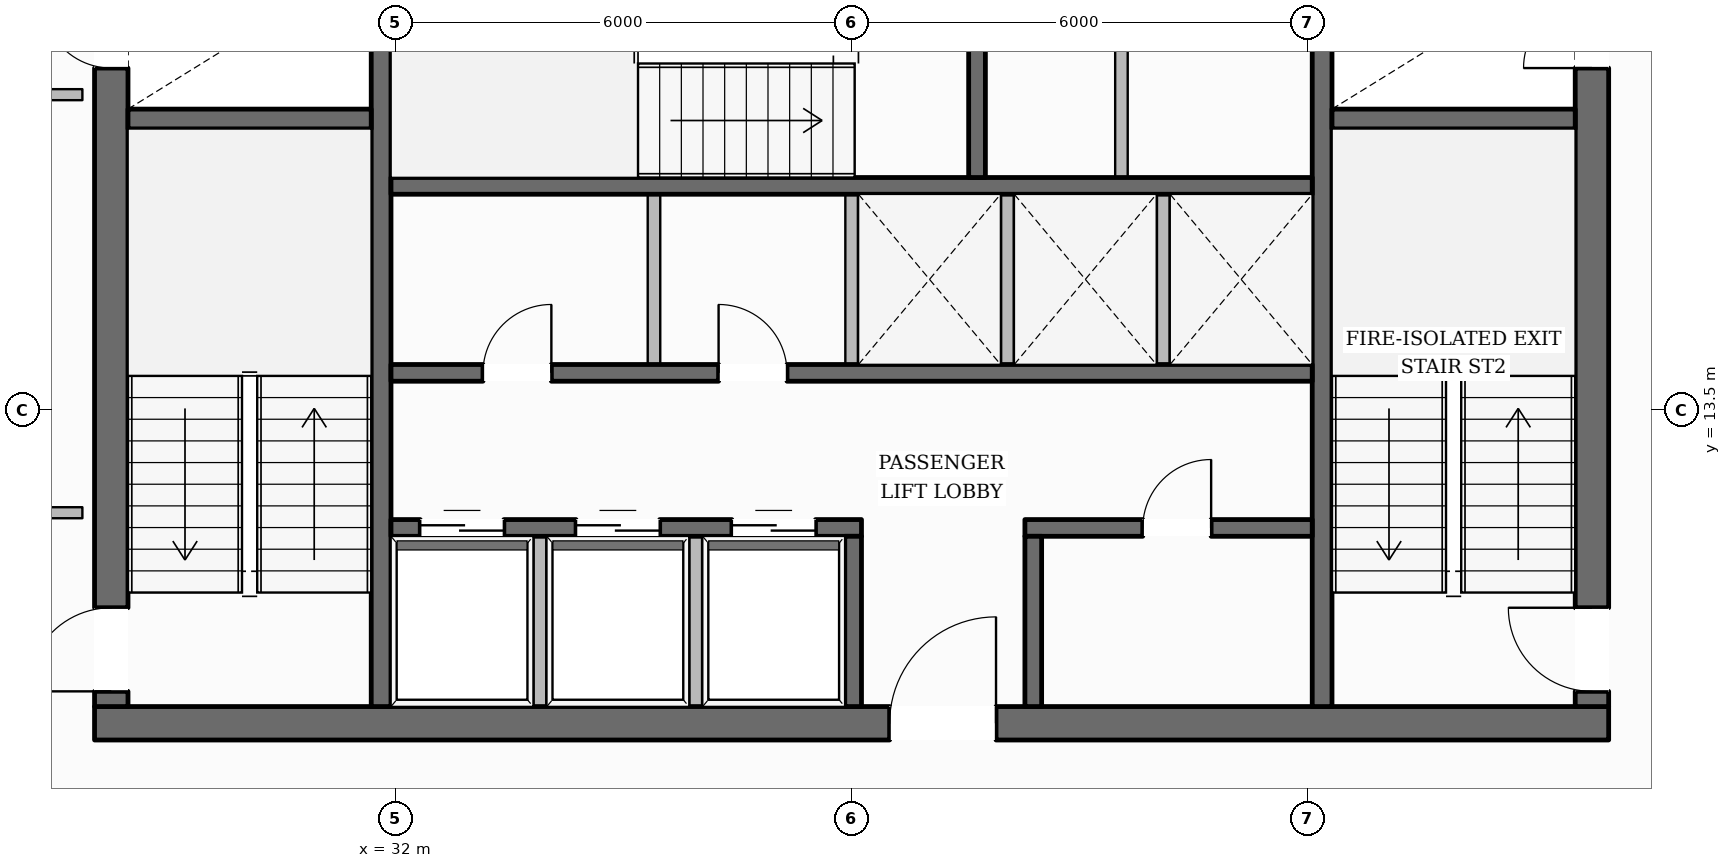
"""IFC4 building model, lengths in metres.
Left out: names, types, materials, properties, quantities, classifications, styles, units other than length and angle.
Written with IfcOpenShell. Run it as: python <this file> out.ifc"""

import sys

from ifc_helpers import new_model, si_unit, direction, frame, frame_2d, origin, place, context, subcontext, project, spatial, rectangle, extrude, element, fill, save


model = new_model("IFC4")
c1 = context("Model", 3, precision=1e-05, world=origin(), true_north=direction((0.0, 1.0)))
c2 = subcontext(c1, "Body", "Model", "MODEL_VIEW")
j1 = project(units=[si_unit("LENGTHUNIT", "METRE"), si_unit("PLANEANGLEUNIT", "RADIAN")], contexts=[c1])
p1 = place(None, origin())
s1 = spatial("IfcSite", under=j1, at=p1, CompositionType="ELEMENT")
p2 = place(p1, origin())
s2 = spatial("IfcBuilding", under=s1, at=p2, CompositionType="ELEMENT")
p3 = place(p2, frame((0.0, 0.0, 165.0)))
s3 = spatial("IfcBuildingStorey", under=s2, at=p3, CompositionType="ELEMENT", Elevation=165.0)
p4 = place(p3, frame((28.04, 9.38, 0.0), z_axis=(0.0, 0.0, 1.0), x_axis=(1.0, 0.0, 0.0)))
e1 = element("IfcWall", 1, at=p4, inside=s3, PredefinedType="SOLIDWALL", context=c2, shape_type="SweptSolid", body=[
    extrude(rectangle(XDim=19.92, YDim=0.44, at=frame_2d((9.96, 0.0))), origin(), (0.0, 0.0, 1.0), 3.6),
])
p5 = place(p4, frame((10.46, 0.0, 0.0)))
e2 = element("IfcOpeningElement", 2, at=p5, cuts=e1, PredefinedType="OPENING", context=c2, shape_type="SweptSolid", body=[
    extrude(rectangle(XDim=1.4, YDim=2.2, at=frame_2d((0.7, 1.1))), frame((0.0, 0.23, 0.0), z_axis=(0.0, -1.0, 0.0), x_axis=(1.0, 0.0, 0.0)), (0.0, 0.0, 1.0), 0.46),
])
p6 = place(p3, frame((28.26, 9.6, 0.0), z_axis=(0.0, 0.0, 1.0), x_axis=(0.0, 1.0, 0.0)))
e3 = element("IfcWall", 3, at=p6, inside=s3, PredefinedType="SOLIDWALL", context=c2, shape_type="SweptSolid", body=[
    extrude(rectangle(XDim=13.0, YDim=0.44, at=frame_2d((6.5, 0.0))), origin(), (0.0, 0.0, 1.0), 3.6),
])
p7 = place(p6, frame((0.2, 0.0, 0.0)))
e4 = element("IfcOpeningElement", 4, at=p7, cuts=e3, PredefinedType="OPENING", context=c2, shape_type="SweptSolid", body=[
    extrude(rectangle(XDim=1.1, YDim=2.15, at=frame_2d((0.55, 1.075))), frame((0.0, 0.23, 0.0), z_axis=(0.0, -1.0, 0.0), x_axis=(1.0, 0.0, 0.0)), (0.0, 0.0, 1.0), 0.46),
])
p8 = place(p6, frame((8.4, 0.0, 0.0)))
e5 = element("IfcOpeningElement", 5, at=p8, cuts=e3, PredefinedType="OPENING", context=c2, shape_type="SweptSolid", body=[
    extrude(rectangle(XDim=0.9, YDim=2.1, at=frame_2d((0.45, 1.05))), frame((0.0, 0.23, 0.0), z_axis=(0.0, -1.0, 0.0), x_axis=(1.0, 0.0, 0.0)), (0.0, 0.0, 1.0), 0.46),
])
p9 = place(p3, frame((47.74, 9.6, 0.0), z_axis=(0.0, 0.0, 1.0), x_axis=(0.0, 1.0, 0.0)))
e6 = element("IfcWall", 6, at=p9, inside=s3, PredefinedType="SOLIDWALL", context=c2, shape_type="SweptSolid", body=[
    extrude(rectangle(XDim=13.0, YDim=0.44, at=frame_2d((6.5, 0.0))), origin(), (0.0, 0.0, 1.0), 3.6),
])
p10 = place(p9, frame((0.2, 0.0, 0.0)))
e7 = element("IfcOpeningElement", 7, at=p10, cuts=e6, PredefinedType="OPENING", context=c2, shape_type="SweptSolid", body=[
    extrude(rectangle(XDim=1.1, YDim=2.15, at=frame_2d((0.55, 1.075))), frame((0.0, 0.23, 0.0), z_axis=(0.0, -1.0, 0.0), x_axis=(1.0, 0.0, 0.0)), (0.0, 0.0, 1.0), 0.46),
])
p11 = place(p9, frame((8.4, 0.0, 0.0)))
e8 = element("IfcOpeningElement", 8, at=p11, cuts=e6, PredefinedType="OPENING", context=c2, shape_type="SweptSolid", body=[
    extrude(rectangle(XDim=0.9, YDim=2.1, at=frame_2d((0.45, 1.05))), frame((0.0, 0.23, 0.0), z_axis=(0.0, -1.0, 0.0), x_axis=(1.0, 0.0, 0.0)), (0.0, 0.0, 1.0), 0.46),
])
p12 = place(p3, frame((31.81, 9.6, 0.0), z_axis=(0.0, 0.0, 1.0), x_axis=(0.0, 1.0, 0.0)))
e9 = element("IfcWall", 9, at=p12, inside=s3, PredefinedType="SHEAR", context=c2, shape_type="SweptSolid", body=[
    extrude(rectangle(XDim=13.0, YDim=0.26, at=frame_2d((6.5, 0.0))), origin(), (0.0, 0.0, 1.0), 3.6),
])
p13 = place(p12, frame((10.925, 0.0, 0.0)))
e10 = element("IfcOpeningElement", 10, at=p13, cuts=e9, PredefinedType="OPENING", context=c2, shape_type="SweptSolid", body=[
    extrude(rectangle(XDim=1.25, YDim=2.25, at=frame_2d((0.625, 1.125))), frame((0.0, 0.14, 0.0), z_axis=(0.0, -1.0, 0.0), x_axis=(1.0, 0.0, 0.0)), (0.0, 0.0, 1.0), 0.28),
])
p14 = place(p3, frame((44.19, 9.6, 0.0), z_axis=(0.0, 0.0, 1.0), x_axis=(0.0, 1.0, 0.0)))
e11 = element("IfcWall", 11, at=p14, inside=s3, PredefinedType="SHEAR", context=c2, shape_type="SweptSolid", body=[
    extrude(rectangle(XDim=13.0, YDim=0.26, at=frame_2d((6.5, 0.0))), origin(), (0.0, 0.0, 1.0), 3.6),
])
p15 = place(p14, frame((10.925, 0.0, 0.0)))
e12 = element("IfcOpeningElement", 12, at=p15, cuts=e11, PredefinedType="OPENING", context=c2, shape_type="SweptSolid", body=[
    extrude(rectangle(XDim=1.25, YDim=2.25, at=frame_2d((0.625, 1.125))), frame((0.0, 0.14, 0.0), z_axis=(0.0, -1.0, 0.0), x_axis=(1.0, 0.0, 0.0)), (0.0, 0.0, 1.0), 0.28),
])
for number, where, z_axis, x_axis in (
    (13, (28.48, 17.33, 0.0), (0.0, 0.0, 1.0), (1.0, 0.0, 0.0)),
    (14, (44.32, 17.33, 0.0), (0.0, 0.0, 1.0), (1.0, 0.0, 0.0)),
):
    element("IfcWall", number, at=place(p3, frame(where, z_axis=z_axis, x_axis=x_axis)), inside=s3, PredefinedType="SHEAR", context=c2, shape_type="SweptSolid", body=[
        extrude(rectangle(XDim=3.2, YDim=0.26, at=frame_2d((1.6, 0.0))), origin(), (0.0, 0.0, 1.0), 3.6),
    ])
p16 = place(p3, frame((31.94, 16.45, 0.0), z_axis=(0.0, 0.0, 1.0), x_axis=(1.0, 0.0, 0.0)))
e15 = element("IfcWall", 15, at=p16, inside=s3, PredefinedType="SOLIDWALL", context=c2, shape_type="SweptSolid", body=[
    extrude(rectangle(XDim=12.12, YDim=0.22, at=frame_2d((6.06, 0.0))), origin(), (0.0, 0.0, 1.0), 3.6),
])
p17 = place(p3, frame((39.65, 16.56, 0.0), z_axis=(0.0, 0.0, 1.0), x_axis=(0.0, 1.0, 0.0)))
e16 = element("IfcWall", 16, at=p17, inside=s3, PredefinedType="SOLIDWALL", context=c2, shape_type="SweptSolid", body=[
    extrude(rectangle(XDim=3.2, YDim=0.22, at=frame_2d((1.6, 0.0))), origin(), (0.0, 0.0, 1.0), 3.6),
])
p18 = place(p3, frame((31.94, 13.99, 0.0), z_axis=(0.0, 0.0, 1.0), x_axis=(1.0, 0.0, 0.0)))
e17 = element("IfcWall", 17, at=p18, inside=s3, PredefinedType="SOLIDWALL", context=c2, shape_type="SweptSolid", body=[
    extrude(rectangle(XDim=12.12, YDim=0.22, at=frame_2d((6.06, 0.0))), origin(), (0.0, 0.0, 1.0), 3.6),
])
p19 = place(p18, frame((1.21, 0.0, 0.0)))
e18 = element("IfcOpeningElement", 18, at=p19, cuts=e17, PredefinedType="OPENING", context=c2, shape_type="SweptSolid", body=[
    extrude(rectangle(XDim=0.9, YDim=2.1, at=frame_2d((0.45, 1.05))), frame((0.0, 0.12, 0.0), z_axis=(0.0, -1.0, 0.0), x_axis=(1.0, 0.0, 0.0)), (0.0, 0.0, 1.0), 0.24),
])
p20 = place(p18, frame((4.31, 0.0, 0.0)))
e19 = element("IfcOpeningElement", 19, at=p20, cuts=e17, PredefinedType="OPENING", context=c2, shape_type="SweptSolid", body=[
    extrude(rectangle(XDim=0.9, YDim=2.1, at=frame_2d((0.45, 1.05))), frame((0.0, 0.12, 0.0), z_axis=(0.0, -1.0, 0.0), x_axis=(1.0, 0.0, 0.0)), (0.0, 0.0, 1.0), 0.24),
])
p21 = place(p3, frame((31.94, 11.95, 0.0), z_axis=(0.0, 0.0, 1.0), x_axis=(1.0, 0.0, 0.0)))
e20 = element("IfcWall", 20, at=p21, inside=s3, PredefinedType="SOLIDWALL", context=c2, shape_type="SweptSolid", body=[
    extrude(rectangle(XDim=6.19, YDim=0.22, at=frame_2d((3.095, 0.0))), origin(), (0.0, 0.0, 1.0), 3.6),
])
p22 = place(p21, frame((0.385, 0.0, 0.0)))
e21 = element("IfcOpeningElement", 21, at=p22, cuts=e20, PredefinedType="OPENING", context=c2, shape_type="SweptSolid", body=[
    extrude(rectangle(XDim=1.1, YDim=2.2, at=frame_2d((0.55, 1.1))), frame((0.0, 0.12, 0.0), z_axis=(0.0, -1.0, 0.0), x_axis=(1.0, 0.0, 0.0)), (0.0, 0.0, 1.0), 0.24),
])
p23 = place(p21, frame((2.435, 0.0, 0.0)))
e22 = element("IfcOpeningElement", 22, at=p23, cuts=e20, PredefinedType="OPENING", context=c2, shape_type="SweptSolid", body=[
    extrude(rectangle(XDim=1.1, YDim=2.2, at=frame_2d((0.55, 1.1))), frame((0.0, 0.12, 0.0), z_axis=(0.0, -1.0, 0.0), x_axis=(1.0, 0.0, 0.0)), (0.0, 0.0, 1.0), 0.24),
])
p24 = place(p21, frame((4.485, 0.0, 0.0)))
e23 = element("IfcOpeningElement", 23, at=p24, cuts=e20, PredefinedType="OPENING", context=c2, shape_type="SweptSolid", body=[
    extrude(rectangle(XDim=1.1, YDim=2.2, at=frame_2d((0.55, 1.1))), frame((0.0, 0.12, 0.0), z_axis=(0.0, -1.0, 0.0), x_axis=(1.0, 0.0, 0.0)), (0.0, 0.0, 1.0), 0.24),
])
p25 = place(p3, frame((40.28, 11.95, 0.0), z_axis=(0.0, 0.0, 1.0), x_axis=(1.0, 0.0, 0.0)))
e24 = element("IfcWall", 24, at=p25, inside=s3, PredefinedType="SOLIDWALL", context=c2, shape_type="SweptSolid", body=[
    extrude(rectangle(XDim=3.78, YDim=0.22, at=frame_2d((1.89, 0.0))), origin(), (0.0, 0.0, 1.0), 3.6),
])
p26 = place(p25, frame((1.55, 0.0, 0.0)))
e25 = element("IfcOpeningElement", 25, at=p26, cuts=e24, PredefinedType="OPENING", context=c2, shape_type="SweptSolid", body=[
    extrude(rectangle(XDim=0.9, YDim=2.1, at=frame_2d((0.45, 1.05))), frame((0.0, 0.12, 0.0), z_axis=(0.0, -1.0, 0.0), x_axis=(1.0, 0.0, 0.0)), (0.0, 0.0, 1.0), 0.24),
])
for number, where, z_axis, x_axis in (
    (26, (38.02, 9.6, 0.0), (0.0, 0.0, 1.0), (0.0, 1.0, 0.0)),
    (27, (40.39, 9.6, 0.0), (0.0, 0.0, 1.0), (0.0, 1.0, 0.0)),
):
    element("IfcWall", number, at=place(p3, frame(where, z_axis=z_axis, x_axis=x_axis)), inside=s3, PredefinedType="SOLIDWALL", context=c2, shape_type="SweptSolid", body=[
        extrude(rectangle(XDim=2.24, YDim=0.22, at=frame_2d((1.12, 0.0))), origin(), (0.0, 0.0, 1.0), 3.6),
    ])
p27 = place(p3, frame((14.964, 12.319, 0.0), z_axis=(0.0, 0.0, 1.0), x_axis=(0.493387150796, 0.869809817966, 0.0)))
e28 = element("IfcWall", 28, at=p27, inside=s3, PredefinedType="STANDARD", context=c2, shape_type="SweptSolid", body=[
    extrude(rectangle(XDim=37.096, YDim=0.35, at=frame_2d((18.548, 0.0))), origin(), (0.0, 0.0, 1.0), 3.132),
])
p28 = place(p27, frame((32.879, 0.0, 0.65)))
e29 = element("IfcOpeningElement", 29, at=p28, cuts=e28, PredefinedType="OPENING", context=c2, shape_type="SweptSolid", body=[
    extrude(rectangle(XDim=1.45, YDim=1.75, at=frame_2d((0.725, 0.875))), frame((0.0, 0.185, 0.0), z_axis=(0.0, -1.0, 0.0), x_axis=(1.0, 0.0, 0.0)), (0.0, 0.0, 1.0), 0.37),
])
p29 = place(p27, frame((26.855, 0.0, 0.65)))
e30 = element("IfcOpeningElement", 30, at=p29, cuts=e28, PredefinedType="OPENING", context=c2, shape_type="SweptSolid", body=[
    extrude(rectangle(XDim=1.45, YDim=1.75, at=frame_2d((0.725, 0.875))), frame((0.0, 0.185, 0.0), z_axis=(0.0, -1.0, 0.0), x_axis=(1.0, 0.0, 0.0)), (0.0, 0.0, 1.0), 0.37),
])
p30 = place(p27, frame((14.807, 0.0, 0.65)))
e31 = element("IfcOpeningElement", 31, at=p30, cuts=e28, PredefinedType="OPENING", context=c2, shape_type="SweptSolid", body=[
    extrude(rectangle(XDim=1.45, YDim=1.75, at=frame_2d((0.725, 0.875))), frame((0.0, 0.185, 0.0), z_axis=(0.0, -1.0, 0.0), x_axis=(1.0, 0.0, 0.0)), (0.0, 0.0, 1.0), 0.37),
])
p31 = place(p27, frame((8.783, 0.0, 0.65)))
e32 = element("IfcOpeningElement", 32, at=p31, cuts=e28, PredefinedType="OPENING", context=c2, shape_type="SweptSolid", body=[
    extrude(rectangle(XDim=1.45, YDim=1.75, at=frame_2d((0.725, 0.875))), frame((0.0, 0.185, 0.0), z_axis=(0.0, -1.0, 0.0), x_axis=(1.0, 0.0, 0.0)), (0.0, 0.0, 1.0), 0.37),
])
p32 = place(p27, frame((2.759, 0.0, 0.65)))
e33 = element("IfcOpeningElement", 33, at=p32, cuts=e28, PredefinedType="OPENING", context=c2, shape_type="SweptSolid", body=[
    extrude(rectangle(XDim=1.45, YDim=1.75, at=frame_2d((0.725, 0.875))), frame((0.0, 0.185, 0.0), z_axis=(0.0, -1.0, 0.0), x_axis=(1.0, 0.0, 0.0)), (0.0, 0.0, 1.0), 0.37),
])
p33 = place(p3, frame((42.733, 44.585, 0.0), z_axis=(0.0, 0.0, 1.0), x_axis=(0.493387150796, -0.869809817966, 0.0)))
e34 = element("IfcWall", 34, at=p33, inside=s3, PredefinedType="STANDARD", context=c2, shape_type="SweptSolid", body=[
    extrude(rectangle(XDim=37.096, YDim=0.35, at=frame_2d((18.548, 0.0))), origin(), (0.0, 0.0, 1.0), 3.132),
])
p34 = place(p33, frame((32.886, 0.0, 0.65)))
e35 = element("IfcOpeningElement", 35, at=p34, cuts=e34, PredefinedType="OPENING", context=c2, shape_type="SweptSolid", body=[
    extrude(rectangle(XDim=1.45, YDim=1.75, at=frame_2d((0.725, 0.875))), frame((0.0, 0.185, 0.0), z_axis=(0.0, -1.0, 0.0), x_axis=(1.0, 0.0, 0.0)), (0.0, 0.0, 1.0), 0.37),
])
p35 = place(p33, frame((26.863, 0.0, 0.65)))
e36 = element("IfcOpeningElement", 36, at=p35, cuts=e34, PredefinedType="OPENING", context=c2, shape_type="SweptSolid", body=[
    extrude(rectangle(XDim=1.45, YDim=1.75, at=frame_2d((0.725, 0.875))), frame((0.0, 0.185, 0.0), z_axis=(0.0, -1.0, 0.0), x_axis=(1.0, 0.0, 0.0)), (0.0, 0.0, 1.0), 0.37),
])
p36 = place(p33, frame((14.814, 0.0, 0.65)))
e37 = element("IfcOpeningElement", 37, at=p36, cuts=e34, PredefinedType="OPENING", context=c2, shape_type="SweptSolid", body=[
    extrude(rectangle(XDim=1.45, YDim=1.75, at=frame_2d((0.725, 0.875))), frame((0.0, 0.185, 0.0), z_axis=(0.0, -1.0, 0.0), x_axis=(1.0, 0.0, 0.0)), (0.0, 0.0, 1.0), 0.37),
])
p37 = place(p33, frame((8.791, 0.0, 0.65)))
e38 = element("IfcOpeningElement", 38, at=p37, cuts=e34, PredefinedType="OPENING", context=c2, shape_type="SweptSolid", body=[
    extrude(rectangle(XDim=1.45, YDim=1.75, at=frame_2d((0.725, 0.875))), frame((0.0, 0.185, 0.0), z_axis=(0.0, -1.0, 0.0), x_axis=(1.0, 0.0, 0.0)), (0.0, 0.0, 1.0), 0.37),
])
p38 = place(p33, frame((2.767, 0.0, 0.65)))
e39 = element("IfcOpeningElement", 39, at=p38, cuts=e34, PredefinedType="OPENING", context=c2, shape_type="SweptSolid", body=[
    extrude(rectangle(XDim=1.45, YDim=1.75, at=frame_2d((0.725, 0.875))), frame((0.0, 0.185, 0.0), z_axis=(0.0, -1.0, 0.0), x_axis=(1.0, 0.0, 0.0)), (0.0, 0.0, 1.0), 0.37),
])
for number, where, z_axis, x_axis in (
    (40, (33.9, 9.52, 0.0), (0.0, 0.0, 1.0), (0.0, 1.0, 0.0)),
    (41, (35.95, 9.52, 0.0), (0.0, 0.0, 1.0), (0.0, 1.0, 0.0)),
):
    element("IfcWall", number, at=place(p3, frame(where, z_axis=z_axis, x_axis=x_axis)), inside=s3, PredefinedType="PARTITIONING", context=c2, shape_type="SweptSolid", body=[
        extrude(rectangle(XDim=2.32, YDim=0.165, at=frame_2d((1.16, 0.0))), origin(), (0.0, 0.0, 1.0), 3.6),
    ])
for number, where, z_axis, x_axis in (
    (42, (38.0, 14.1, 0.0), (0.0, 0.0, 1.0), (0.0, 1.0, 0.0)),
    (43, (35.4, 14.1, 0.0), (0.0, 0.0, 1.0), (0.0, 1.0, 0.0)),
    (44, (40.05, 14.1, 0.0), (0.0, 0.0, 1.0), (0.0, 1.0, 0.0)),
    (45, (42.1, 14.1, 0.0), (0.0, 0.0, 1.0), (0.0, 1.0, 0.0)),
):
    element("IfcWall", number, at=place(p3, frame(where, z_axis=z_axis, x_axis=x_axis)), inside=s3, PredefinedType="PARTITIONING", context=c2, shape_type="SweptSolid", body=[
        extrude(rectangle(XDim=2.24, YDim=0.165, at=frame_2d((1.12, 0.0))), origin(), (0.0, 0.0, 1.0), 3.6),
    ])
p39 = place(p3, frame((41.55, 16.56, 0.0), z_axis=(0.0, 0.0, 1.0), x_axis=(0.0, 1.0, 0.0)))
e46 = element("IfcWall", 46, at=p39, inside=s3, PredefinedType="PARTITIONING", context=c2, shape_type="SweptSolid", body=[
    extrude(rectangle(XDim=3.2, YDim=0.165, at=frame_2d((1.6, 0.0))), origin(), (0.0, 0.0, 1.0), 3.6),
])
for number, where, z_axis, x_axis in (
    (47, (27.88, 17.65, 0.0), (0.0, 0.0, 1.0), (-1.0, 0.0, 0.0)),
    (48, (26.06, 12.15, 0.0), (0.0, 0.0, 1.0), (1.0, 0.0, 0.0)),
):
    element("IfcWall", number, at=place(p3, frame(where, z_axis=z_axis, x_axis=x_axis)), inside=s3, PredefinedType="PARTITIONING", context=c2, shape_type="SweptSolid", body=[
        extrude(rectangle(XDim=1.82, YDim=0.145, at=frame_2d((0.91, 0.0))), origin(), (0.0, 0.0, 1.0), 3.6),
    ])
p40 = place(p7, origin())
e49 = element("IfcDoor", 49, at=p40, inside=s3, OperationType="SINGLE_SWING_LEFT", PredefinedType="DOOR", context=c2, shape_type="SweptSolid", body=[
    extrude(rectangle(XDim=1.1, YDim=2.15, at=frame_2d((0.55, 1.075))), frame((0.0, 0.025, 0.0), z_axis=(0.0, -1.0, 0.0), x_axis=(1.0, 0.0, 0.0)), (0.0, 0.0, 1.0), 0.05),
])
fill(e4, e49)
p41 = place(p10, origin())
e50 = element("IfcDoor", 50, at=p41, inside=s3, OperationType="SINGLE_SWING_RIGHT", PredefinedType="DOOR", context=c2, shape_type="SweptSolid", body=[
    extrude(rectangle(XDim=1.1, YDim=2.15, at=frame_2d((0.55, 1.075))), frame((0.0, 0.025, 0.0), z_axis=(0.0, -1.0, 0.0), x_axis=(1.0, 0.0, 0.0)), (0.0, 0.0, 1.0), 0.05),
])
fill(e7, e50)
p42 = place(p8, origin())
e51 = element("IfcDoor", 51, at=p42, inside=s3, OperationType="SINGLE_SWING_RIGHT", PredefinedType="DOOR", context=c2, shape_type="SweptSolid", body=[
    extrude(rectangle(XDim=0.9, YDim=2.1, at=frame_2d((0.45, 1.05))), frame((0.0, 0.025, 0.0), z_axis=(0.0, -1.0, 0.0), x_axis=(1.0, 0.0, 0.0)), (0.0, 0.0, 1.0), 0.05),
])
fill(e5, e51)
p43 = place(p11, origin())
e52 = element("IfcDoor", 52, at=p43, inside=s3, OperationType="SINGLE_SWING_LEFT", PredefinedType="DOOR", context=c2, shape_type="SweptSolid", body=[
    extrude(rectangle(XDim=0.9, YDim=2.1, at=frame_2d((0.45, 1.05))), frame((0.0, 0.025, 0.0), z_axis=(0.0, -1.0, 0.0), x_axis=(1.0, 0.0, 0.0)), (0.0, 0.0, 1.0), 0.05),
])
fill(e8, e52)
p44 = place(p5, origin())
e53 = element("IfcDoor", 53, at=p44, inside=s3, OperationType="SINGLE_SWING_RIGHT", PredefinedType="DOOR", context=c2, shape_type="SweptSolid", body=[
    extrude(rectangle(XDim=1.4, YDim=2.2, at=frame_2d((0.7, 1.1))), frame((0.0, 0.025, 0.0), z_axis=(0.0, -1.0, 0.0), x_axis=(1.0, 0.0, 0.0)), (0.0, 0.0, 1.0), 0.05),
])
fill(e2, e53)
p45 = place(p22, origin())
e54 = element("IfcDoor", 54, at=p45, inside=s3, OperationType="DOUBLE_DOOR_SLIDING", PredefinedType="DOOR", context=c2, shape_type="SweptSolid", body=[
    extrude(rectangle(XDim=1.1, YDim=2.2, at=frame_2d((0.55, 1.1))), frame((0.0, 0.025, 0.0), z_axis=(0.0, -1.0, 0.0), x_axis=(1.0, 0.0, 0.0)), (0.0, 0.0, 1.0), 0.05),
])
fill(e21, e54)
p46 = place(p23, origin())
e55 = element("IfcDoor", 55, at=p46, inside=s3, OperationType="DOUBLE_DOOR_SLIDING", PredefinedType="DOOR", context=c2, shape_type="SweptSolid", body=[
    extrude(rectangle(XDim=1.1, YDim=2.2, at=frame_2d((0.55, 1.1))), frame((0.0, 0.025, 0.0), z_axis=(0.0, -1.0, 0.0), x_axis=(1.0, 0.0, 0.0)), (0.0, 0.0, 1.0), 0.05),
])
fill(e22, e55)
p47 = place(p24, origin())
e56 = element("IfcDoor", 56, at=p47, inside=s3, OperationType="DOUBLE_DOOR_SLIDING", PredefinedType="DOOR", context=c2, shape_type="SweptSolid", body=[
    extrude(rectangle(XDim=1.1, YDim=2.2, at=frame_2d((0.55, 1.1))), frame((0.0, 0.025, 0.0), z_axis=(0.0, -1.0, 0.0), x_axis=(1.0, 0.0, 0.0)), (0.0, 0.0, 1.0), 0.05),
])
fill(e23, e56)
p48 = place(p19, origin())
e57 = element("IfcDoor", 57, at=p48, inside=s3, OperationType="SINGLE_SWING_RIGHT", PredefinedType="DOOR", context=c2, shape_type="SweptSolid", body=[
    extrude(rectangle(XDim=0.9, YDim=2.1, at=frame_2d((0.45, 1.05))), frame((0.0, 0.025, 0.0), z_axis=(0.0, -1.0, 0.0), x_axis=(1.0, 0.0, 0.0)), (0.0, 0.0, 1.0), 0.05),
])
fill(e18, e57)
p49 = place(p20, origin())
e58 = element("IfcDoor", 58, at=p49, inside=s3, OperationType="SINGLE_SWING_LEFT", PredefinedType="DOOR", context=c2, shape_type="SweptSolid", body=[
    extrude(rectangle(XDim=0.9, YDim=2.1, at=frame_2d((0.45, 1.05))), frame((0.0, 0.025, 0.0), z_axis=(0.0, -1.0, 0.0), x_axis=(1.0, 0.0, 0.0)), (0.0, 0.0, 1.0), 0.05),
])
fill(e19, e58)
p50 = place(p26, origin())
e59 = element("IfcDoor", 59, at=p50, inside=s3, OperationType="SINGLE_SWING_RIGHT", PredefinedType="DOOR", context=c2, shape_type="SweptSolid", body=[
    extrude(rectangle(XDim=0.9, YDim=2.1, at=frame_2d((0.45, 1.05))), frame((0.0, 0.025, 0.0), z_axis=(0.0, -1.0, 0.0), x_axis=(1.0, 0.0, 0.0)), (0.0, 0.0, 1.0), 0.05),
])
fill(e25, e59)
save(model, sys.argv[1])
